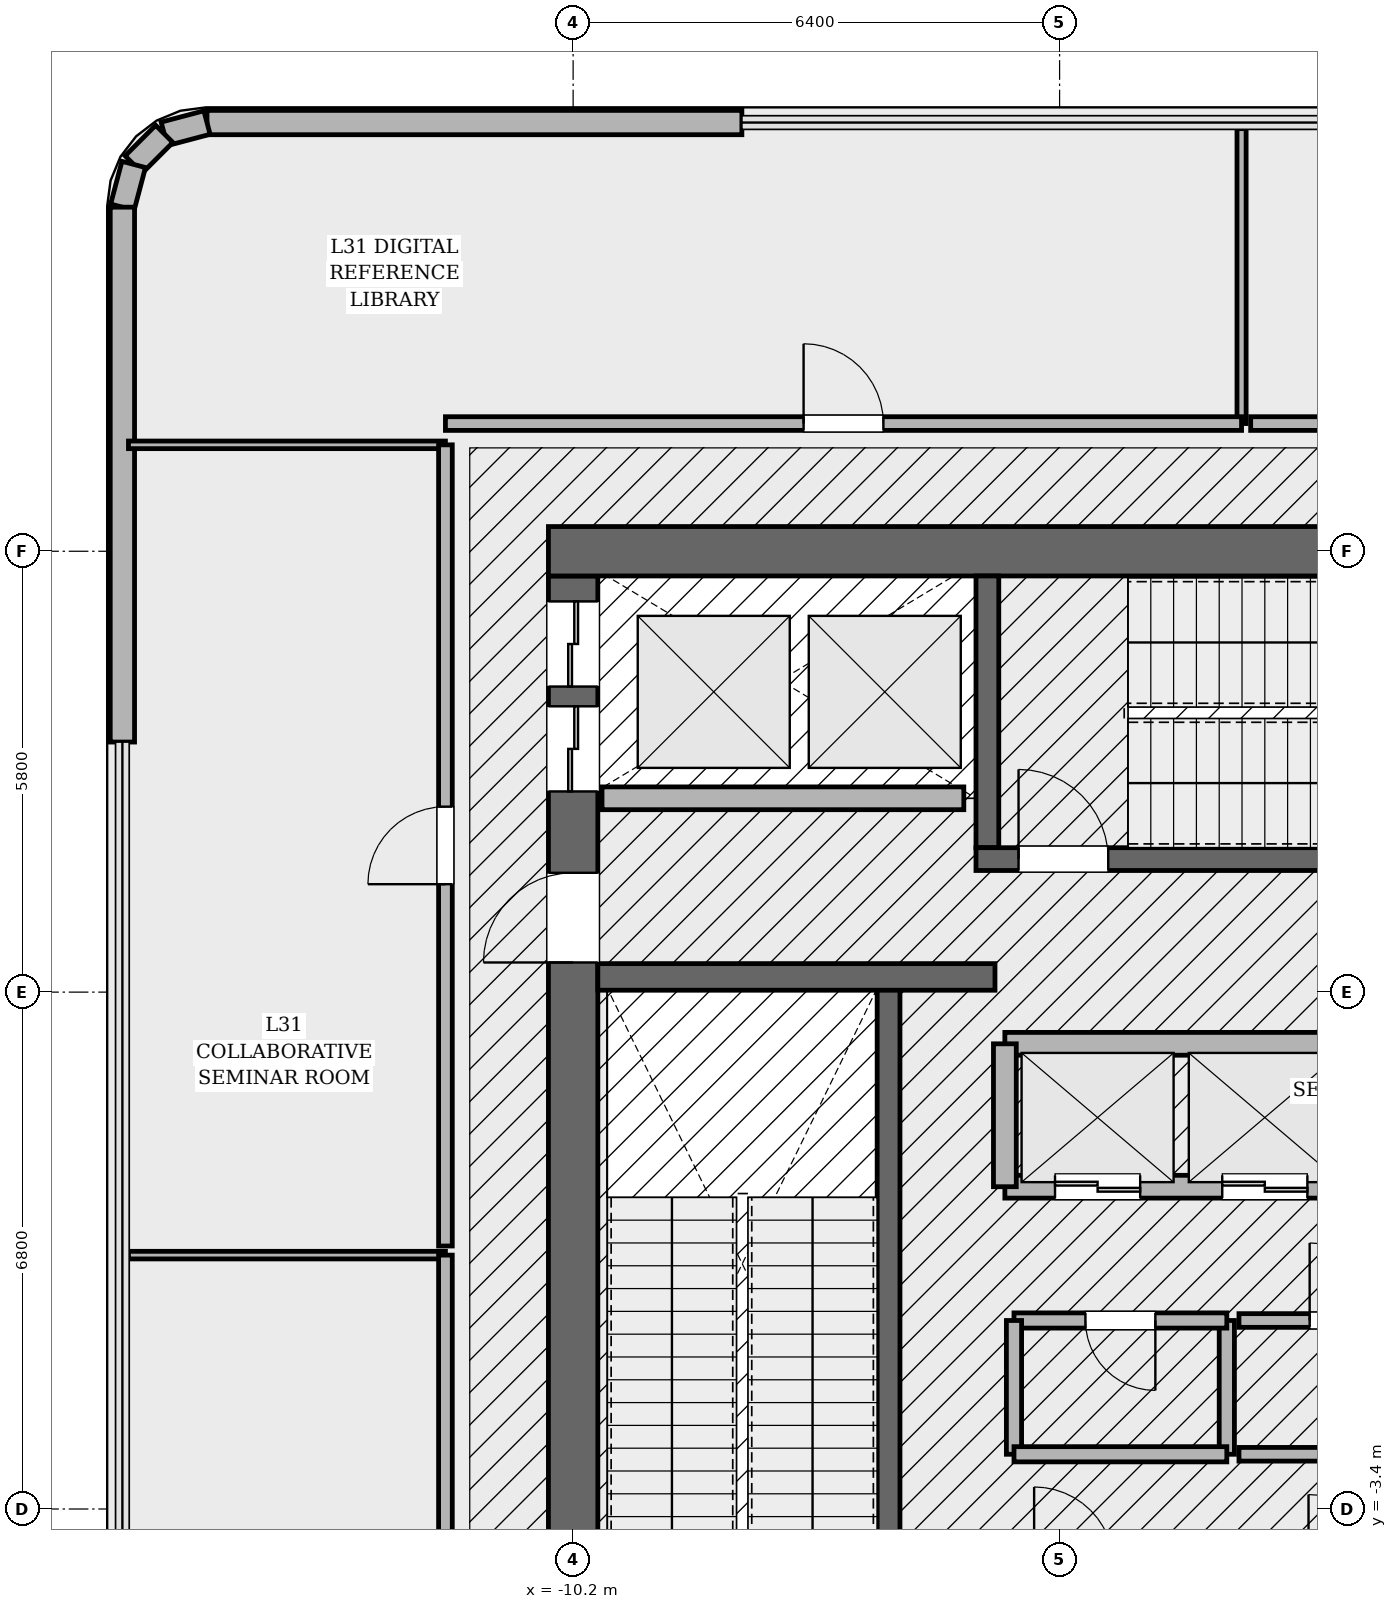
"""IFC4 building model, lengths in metres.
Left out: names, types, materials, properties, quantities, classifications, styles, units other than length and angle.
Written with IfcOpenShell. Run it as: python <this file> out.ifc"""

import sys

from ifc_helpers import new_model, si_unit, direction, frame, frame_2d, origin, place, context, subcontext, project, spatial, rectangle, extrude, element, fill, save


model = new_model("IFC4")
c1 = context("Model", 3, precision=1e-05, world=origin(), true_north=direction((0.0, 1.0)))
c2 = subcontext(c1, "Body", "Model", "MODEL_VIEW")
j1 = project(units=[si_unit("LENGTHUNIT", "METRE"), si_unit("PLANEANGLEUNIT", "RADIAN")], contexts=[c1])
p1 = place(None, origin())
s1 = spatial("IfcSite", under=j1, at=p1, CompositionType="ELEMENT")
p2 = place(p1, origin())
s2 = spatial("IfcBuilding", under=s1, at=p2, CompositionType="ELEMENT")
p3 = place(p2, frame((0.0, 0.0, 135.0)))
s3 = spatial("IfcBuildingStorey", under=s2, at=p3, CompositionType="ELEMENT", Elevation=135.0)
p4 = place(p3, frame((-10.2, -8.875, 0.0), z_axis=(0.0, 0.0, 1.0), x_axis=(0.0, 1.0, 0.0)))
e1 = element("IfcWall", 1, at=p4, inside=s3, PredefinedType="SHEAR", context=c2, shape_type="SweptSolid", body=[
    extrude(rectangle(XDim=17.75, YDim=0.65, at=frame_2d((8.875, 0.0))), origin(), (0.0, 0.0, 1.0), 4.8),
])
p5 = place(p4, frame((12.665, 0.0, 0.0)))
e2 = element("IfcOpeningElement", 2, at=p5, cuts=e1, PredefinedType="OPENING", context=c2, shape_type="SweptSolid", body=[
    extrude(rectangle(XDim=1.18, YDim=2.2, at=frame_2d((0.59, 1.1))), frame((0.0, 0.335, 0.0), z_axis=(0.0, -1.0, 0.0), x_axis=(1.0, 0.0, 0.0)), (0.0, 0.0, 1.0), 0.67),
])
p6 = place(p4, frame((14.915, 0.0, 0.0)))
e3 = element("IfcOpeningElement", 3, at=p6, cuts=e1, PredefinedType="OPENING", context=c2, shape_type="SweptSolid", body=[
    extrude(rectangle(XDim=1.12, YDim=2.25, at=frame_2d((0.56, 1.125))), frame((0.0, 0.335, 0.0), z_axis=(0.0, -1.0, 0.0), x_axis=(1.0, 0.0, 0.0)), (0.0, 0.0, 1.0), 0.67),
])
p7 = place(p4, frame((16.295, 0.0, 0.0)))
e4 = element("IfcOpeningElement", 4, at=p7, cuts=e1, PredefinedType="OPENING", context=c2, shape_type="SweptSolid", body=[
    extrude(rectangle(XDim=1.12, YDim=2.25, at=frame_2d((0.56, 1.125))), frame((0.0, 0.335, 0.0), z_axis=(0.0, -1.0, 0.0), x_axis=(1.0, 0.0, 0.0)), (0.0, 0.0, 1.0), 0.67),
])
p8 = place(p3, frame((-10.525, 9.2, 0.0), z_axis=(0.0, 0.0, 1.0), x_axis=(1.0, 0.0, 0.0)))
e5 = element("IfcWall", 5, at=p8, inside=s3, PredefinedType="SHEAR", context=c2, shape_type="SweptSolid", body=[
    extrude(rectangle(XDim=21.05, YDim=0.65, at=frame_2d((10.525, 0.0))), origin(), (0.0, 0.0, 1.0), 4.8),
])
p9 = place(p3, frame((-6.05, -5.5, 0.0), z_axis=(0.0, 0.0, 1.0), x_axis=(0.0, 1.0, 0.0)))
e6 = element("IfcWall", 6, at=p9, inside=s3, PredefinedType="SOLIDWALL", context=c2, shape_type="SweptSolid", body=[
    extrude(rectangle(XDim=8.95, YDim=0.3, at=frame_2d((4.475, 0.0))), origin(), (0.0, 0.0, 1.0), 4.8),
])
p10 = place(p3, frame((-4.75, 5.3, 0.0), z_axis=(0.0, 0.0, 1.0), x_axis=(0.0, 1.0, 0.0)))
e7 = element("IfcWall", 7, at=p10, inside=s3, PredefinedType="SOLIDWALL", context=c2, shape_type="SweptSolid", body=[
    extrude(rectangle(XDim=3.575, YDim=0.3, at=frame_2d((1.788, 0.0))), origin(), (0.0, 0.0, 1.0), 4.8),
])
p11 = place(p3, frame((-4.9, 5.15, 0.0), z_axis=(0.0, 0.0, 1.0), x_axis=(1.0, 0.0, 0.0)))
e8 = element("IfcWall", 8, at=p11, inside=s3, PredefinedType="SOLIDWALL", context=c2, shape_type="SweptSolid", body=[
    extrude(rectangle(XDim=9.8, YDim=0.3, at=frame_2d((4.9, 0.0))), origin(), (0.0, 0.0, 1.0), 4.8),
])
p12 = place(p11, frame((0.56, 0.0, 0.0)))
e9 = element("IfcOpeningElement", 9, at=p12, cuts=e8, PredefinedType="OPENING", context=c2, shape_type="SweptSolid", body=[
    extrude(rectangle(XDim=1.18, YDim=2.2, at=frame_2d((0.59, 1.1))), frame((0.0, 0.16, 0.0), z_axis=(0.0, -1.0, 0.0), x_axis=(1.0, 0.0, 0.0)), (0.0, 0.0, 1.0), 0.32),
])
p13 = place(p3, frame((-9.875, 3.6, 0.0), z_axis=(0.0, 0.0, 1.0), x_axis=(1.0, 0.0, 0.0)))
e10 = element("IfcWall", 10, at=p13, inside=s3, PredefinedType="SOLIDWALL", context=c2, shape_type="SweptSolid", body=[
    extrude(rectangle(XDim=5.225, YDim=0.35, at=frame_2d((2.613, 0.0))), origin(), (0.0, 0.0, 1.0), 4.8),
])
p14 = place(p3, frame((-7.98, 14.84, 0.0), z_axis=(0.0, 0.0, 1.0), x_axis=(-1.0, 0.0, 0.0)))
e11 = element("IfcWall", 11, at=p14, inside=s3, PredefinedType="SOLIDWALL", context=c2, shape_type="SweptSolid", body=[
    extrude(rectangle(XDim=7.037, YDim=0.32, at=frame_2d((3.519, 0.0))), origin(), (0.0, 0.0, 1.0), 3.194),
])
p15 = place(p3, frame((-15.017, 14.84, 0.0), z_axis=(0.0, 0.0, 1.0), x_axis=(-0.966665515501, -0.256042537758, 0.0)))
e12 = element("IfcWall", 12, at=p15, inside=s3, PredefinedType="SOLIDWALL", context=c2, shape_type="SweptSolid", body=[
    extrude(rectangle(XDim=0.582, YDim=0.32, at=frame_2d((0.291, 0.0))), origin(), (0.0, 0.0, 1.0), 4.52),
])
p16 = place(p3, frame((-15.579, 14.691, 0.0), z_axis=(0.0, 0.0, 1.0), x_axis=(-0.707106781187, -0.707106781187, 0.0)))
e13 = element("IfcWall", 13, at=p16, inside=s3, PredefinedType="SOLIDWALL", context=c2, shape_type="SweptSolid", body=[
    extrude(rectangle(XDim=0.569, YDim=0.32, at=frame_2d((0.284, 0.0))), origin(), (0.0, 0.0, 1.0), 4.52),
])
p17 = place(p3, frame((-15.981, 14.289, 0.0), z_axis=(0.0, 0.0, 1.0), x_axis=(-0.255650250031, -0.966769336325, 0.0)))
e14 = element("IfcWall", 14, at=p17, inside=s3, PredefinedType="SOLIDWALL", context=c2, shape_type="SweptSolid", body=[
    extrude(rectangle(XDim=0.582, YDim=0.32, at=frame_2d((0.291, 0.0))), origin(), (0.0, 0.0, 1.0), 4.52),
])
p18 = place(p3, frame((-16.13, 13.727, 0.0), z_axis=(0.0, 0.0, 1.0), x_axis=(0.0, -1.0, 0.0)))
e15 = element("IfcWall", 15, at=p18, inside=s3, PredefinedType="SOLIDWALL", context=c2, shape_type="SweptSolid", body=[
    extrude(rectangle(XDim=7.037, YDim=0.32, at=frame_2d((3.519, 0.0))), origin(), (0.0, 0.0, 1.0), 3.194),
])
p19 = place(p3, frame((-4.52, 0.84, 0.0), z_axis=(0.0, 0.0, 1.0), x_axis=(1.0, 0.0, 0.0)))
e16 = element("IfcWall", 16, at=p19, inside=s3, PredefinedType="SOLIDWALL", context=c2, shape_type="SweptSolid", body=[
    extrude(rectangle(XDim=9.04, YDim=0.3, at=frame_2d((4.52, 0.0))), origin(), (0.0, 0.0, 1.0), 4.52),
])
p20 = place(p19, frame((0.66, 0.0, 0.0)))
e17 = element("IfcOpeningElement", 17, at=p20, cuts=e16, PredefinedType="OPENING", context=c2, shape_type="SweptSolid", body=[
    extrude(rectangle(XDim=1.12, YDim=2.25, at=frame_2d((0.56, 1.125))), frame((0.0, 0.16, 0.0), z_axis=(0.0, -1.0, 0.0), x_axis=(1.0, 0.0, 0.0)), (0.0, 0.0, 1.0), 0.32),
])
p21 = place(p19, frame((2.86, 0.0, 0.0)))
e18 = element("IfcOpeningElement", 18, at=p21, cuts=e16, PredefinedType="OPENING", context=c2, shape_type="SweptSolid", body=[
    extrude(rectangle(XDim=1.12, YDim=2.25, at=frame_2d((0.56, 1.125))), frame((0.0, 0.16, 0.0), z_axis=(0.0, -1.0, 0.0), x_axis=(1.0, 0.0, 0.0)), (0.0, 0.0, 1.0), 0.32),
])
p22 = place(p19, frame((5.06, 0.0, 0.0)))
e19 = element("IfcOpeningElement", 19, at=p22, cuts=e16, PredefinedType="OPENING", context=c2, shape_type="SweptSolid", body=[
    extrude(rectangle(XDim=1.12, YDim=2.25, at=frame_2d((0.56, 1.125))), frame((0.0, 0.16, 0.0), z_axis=(0.0, -1.0, 0.0), x_axis=(1.0, 0.0, 0.0)), (0.0, 0.0, 1.0), 0.32),
])
p23 = place(p19, frame((7.26, 0.0, 0.0)))
e20 = element("IfcOpeningElement", 20, at=p23, cuts=e16, PredefinedType="OPENING", context=c2, shape_type="SweptSolid", body=[
    extrude(rectangle(XDim=1.12, YDim=2.25, at=frame_2d((0.56, 1.125))), frame((0.0, 0.16, 0.0), z_axis=(0.0, -1.0, 0.0), x_axis=(1.0, 0.0, 0.0)), (0.0, 0.0, 1.0), 0.32),
])
p24 = place(p3, frame((-4.52, 2.72, 0.0), z_axis=(0.0, 0.0, 1.0), x_axis=(1.0, 0.0, 0.0)))
e21 = element("IfcWall", 21, at=p24, inside=s3, PredefinedType="SOLIDWALL", context=c2, shape_type="SweptSolid", body=[
    extrude(rectangle(XDim=9.04, YDim=0.3, at=frame_2d((4.52, 0.0))), origin(), (0.0, 0.0, 1.0), 4.52),
])
p25 = place(p3, frame((-4.52, 0.84, 0.0), z_axis=(0.0, 0.0, 1.0), x_axis=(0.0, 1.0, 0.0)))
e22 = element("IfcWall", 22, at=p25, inside=s3, PredefinedType="SOLIDWALL", context=c2, shape_type="SweptSolid", body=[
    extrude(rectangle(XDim=1.88, YDim=0.3, at=frame_2d((0.94, 0.0))), origin(), (0.0, 0.0, 1.0), 4.52),
])
p26 = place(p3, frame((-9.82, 5.95, 0.0), z_axis=(0.0, 0.0, 1.0), x_axis=(1.0, 0.0, 0.0)))
e23 = element("IfcWall", 23, at=p26, inside=s3, PredefinedType="SOLIDWALL", context=c2, shape_type="SweptSolid", body=[
    extrude(rectangle(XDim=4.76, YDim=0.3, at=frame_2d((2.38, 0.0))), origin(), (0.0, 0.0, 1.0), 4.52),
])
p27 = place(p3, frame((-1.6, -2.68, 0.0), z_axis=(0.0, 0.0, 1.0), x_axis=(0.0, 1.0, 0.0)))
e24 = element("IfcWall", 24, at=p27, inside=s3, PredefinedType="SOLIDWALL", context=c2, shape_type="SweptSolid", body=[
    extrude(rectangle(XDim=1.76, YDim=0.2, at=frame_2d((0.88, 0.0))), origin(), (0.0, 0.0, 1.0), 4.52),
])
p28 = place(p3, frame((-1.6, -0.92, 0.0), z_axis=(0.0, 0.0, 1.0), x_axis=(-1.0, 0.0, 0.0)))
e25 = element("IfcWall", 25, at=p28, inside=s3, PredefinedType="SOLIDWALL", context=c2, shape_type="SweptSolid", body=[
    extrude(rectangle(XDim=2.8, YDim=0.2, at=frame_2d((1.4, 0.0))), origin(), (0.0, 0.0, 1.0), 4.52),
])
p29 = place(p28, frame((0.94, 0.0, 0.0)))
e26 = element("IfcOpeningElement", 26, at=p29, cuts=e25, PredefinedType="OPENING", context=c2, shape_type="SweptSolid", body=[
    extrude(rectangle(XDim=0.92, YDim=2.1, at=frame_2d((0.46, 1.05))), frame((0.0, 0.11, 0.0), z_axis=(0.0, -1.0, 0.0), x_axis=(1.0, 0.0, 0.0)), (0.0, 0.0, 1.0), 0.22),
])
p30 = place(p3, frame((-4.4, -0.92, 0.0), z_axis=(0.0, 0.0, 1.0), x_axis=(0.0, -1.0, 0.0)))
e27 = element("IfcWall", 27, at=p30, inside=s3, PredefinedType="SOLIDWALL", context=c2, shape_type="SweptSolid", body=[
    extrude(rectangle(XDim=1.76, YDim=0.2, at=frame_2d((0.88, 0.0))), origin(), (0.0, 0.0, 1.0), 4.52),
])
p31 = place(p3, frame((-4.4, -2.68, 0.0), z_axis=(0.0, 0.0, 1.0), x_axis=(1.0, 0.0, 0.0)))
e28 = element("IfcWall", 28, at=p31, inside=s3, PredefinedType="SOLIDWALL", context=c2, shape_type="SweptSolid", body=[
    extrude(rectangle(XDim=2.8, YDim=0.2, at=frame_2d((1.4, 0.0))), origin(), (0.0, 0.0, 1.0), 4.52),
])
p32 = place(p3, frame((1.44, -0.92, 0.0), z_axis=(0.0, 0.0, 1.0), x_axis=(-1.0, 0.0, 0.0)))
e29 = element("IfcWall", 29, at=p32, inside=s3, PredefinedType="PARTITIONING", context=c2, shape_type="SweptSolid", body=[
    extrude(rectangle(XDim=2.88, YDim=0.18, at=frame_2d((1.44, 0.0))), origin(), (0.0, 0.0, 1.0), 4.52),
])
p33 = place(p32, frame((0.93, 0.0, 0.0)))
e30 = element("IfcOpeningElement", 30, at=p33, cuts=e29, PredefinedType="OPENING", context=c2, shape_type="SweptSolid", body=[
    extrude(rectangle(XDim=1.02, YDim=2.2, at=frame_2d((0.51, 1.1))), frame((0.0, 0.1, 0.0), z_axis=(0.0, -1.0, 0.0), x_axis=(1.0, 0.0, 0.0)), (0.0, 0.0, 1.0), 0.2),
])
p34 = place(p3, frame((-1.44, -2.68, 0.0), z_axis=(0.0, 0.0, 1.0), x_axis=(1.0, 0.0, 0.0)))
e31 = element("IfcWall", 31, at=p34, inside=s3, PredefinedType="PARTITIONING", context=c2, shape_type="SweptSolid", body=[
    extrude(rectangle(XDim=2.88, YDim=0.18, at=frame_2d((1.44, 0.0))), origin(), (0.0, 0.0, 1.0), 4.52),
])
p35 = place(p3, frame((-16.05, -0.06, 0.0), z_axis=(0.0, 0.0, 1.0), x_axis=(1.0, 0.0, 0.0)))
e32 = element("IfcWall", 32, at=p35, inside=s3, PredefinedType="PARTITIONING", context=c2, shape_type="SweptSolid", body=[
    extrude(rectangle(XDim=4.17, YDim=0.1, at=frame_2d((2.085, 0.0))), origin(), (0.0, 0.0, 1.0), 4.52),
])
p36 = place(p3, frame((-11.88, -0.06, 0.0), z_axis=(0.0, 0.0, 1.0), x_axis=(0.0, -1.0, 0.0)))
e33 = element("IfcWall", 33, at=p36, inside=s3, PredefinedType="PARTITIONING", context=c2, shape_type="SweptSolid", body=[
    extrude(rectangle(XDim=10.54, YDim=0.18, at=frame_2d((5.27, 0.0))), origin(), (0.0, 0.0, 1.0), 3.194),
])
p37 = place(p36, frame((4.76, 0.0, 0.0)))
e34 = element("IfcOpeningElement", 34, at=p37, cuts=e33, PredefinedType="OPENING", context=c2, shape_type="SweptSolid", body=[
    extrude(rectangle(XDim=1.02, YDim=2.2, at=frame_2d((0.51, 1.1))), frame((0.0, 0.1, 0.0), z_axis=(0.0, -1.0, 0.0), x_axis=(1.0, 0.0, 0.0)), (0.0, 0.0, 1.0), 0.2),
])
p38 = place(p3, frame((-16.05, 10.6, 0.0), z_axis=(0.0, 0.0, 1.0), x_axis=(1.0, 0.0, 0.0)))
e35 = element("IfcWall", 35, at=p38, inside=s3, PredefinedType="PARTITIONING", context=c2, shape_type="SweptSolid", body=[
    extrude(rectangle(XDim=4.17, YDim=0.1, at=frame_2d((2.085, 0.0))), origin(), (0.0, 0.0, 1.0), 4.114),
])
p39 = place(p3, frame((-11.88, 10.6, 0.0), z_axis=(0.0, 0.0, 1.0), x_axis=(0.0, -1.0, 0.0)))
e36 = element("IfcWall", 36, at=p39, inside=s3, PredefinedType="PARTITIONING", context=c2, shape_type="SweptSolid", body=[
    extrude(rectangle(XDim=10.54, YDim=0.18, at=frame_2d((5.27, 0.0))), origin(), (0.0, 0.0, 1.0), 3.194),
])
p40 = place(p39, frame((4.76, 0.0, 0.0)))
e37 = element("IfcOpeningElement", 37, at=p40, cuts=e36, PredefinedType="OPENING", context=c2, shape_type="SweptSolid", body=[
    extrude(rectangle(XDim=1.02, YDim=2.2, at=frame_2d((0.51, 1.1))), frame((0.0, 0.1, 0.0), z_axis=(0.0, -1.0, 0.0), x_axis=(1.0, 0.0, 0.0)), (0.0, 0.0, 1.0), 0.2),
])
p41 = place(p3, frame((-1.406, 14.76, 0.0), z_axis=(0.0, 0.0, 1.0), x_axis=(0.0, -1.0, 0.0)))
e38 = element("IfcWall", 38, at=p41, inside=s3, PredefinedType="PARTITIONING", context=c2, shape_type="SweptSolid", body=[
    extrude(rectangle(XDim=3.88, YDim=0.12, at=frame_2d((1.94, 0.0))), origin(), (0.0, 0.0, 1.0), 4.52),
])
p42 = place(p3, frame((-1.406, 10.88, 0.0), z_axis=(0.0, 0.0, 1.0), x_axis=(-1.0, 0.0, 0.0)))
e39 = element("IfcWall", 39, at=p42, inside=s3, PredefinedType="PARTITIONING", context=c2, shape_type="SweptSolid", body=[
    extrude(rectangle(XDim=10.474, YDim=0.18, at=frame_2d((5.237, 0.0))), origin(), (0.0, 0.0, 1.0), 3.194),
])
p43 = place(p42, frame((4.712, 0.0, 0.0)))
e40 = element("IfcOpeningElement", 40, at=p43, cuts=e39, PredefinedType="OPENING", context=c2, shape_type="SweptSolid", body=[
    extrude(rectangle(XDim=1.05, YDim=2.2, at=frame_2d((0.525, 1.1))), frame((0.0, 0.1, 0.0), z_axis=(0.0, -1.0, 0.0), x_axis=(1.0, 0.0, 0.0)), (0.0, 0.0, 1.0), 0.2),
])
p44 = place(p3, frame((11.88, 10.88, 0.0), z_axis=(0.0, 0.0, 1.0), x_axis=(-1.0, 0.0, 0.0)))
e41 = element("IfcWall", 41, at=p44, inside=s3, PredefinedType="PARTITIONING", context=c2, shape_type="SweptSolid", body=[
    extrude(rectangle(XDim=13.166, YDim=0.18, at=frame_2d((6.583, 0.0))), origin(), (0.0, 0.0, 1.0), 3.194),
])
p45 = place(p44, frame((6.058, 0.0, 0.0)))
e42 = element("IfcOpeningElement", 42, at=p45, cuts=e41, PredefinedType="OPENING", context=c2, shape_type="SweptSolid", body=[
    extrude(rectangle(XDim=1.05, YDim=2.2, at=frame_2d((0.525, 1.1))), frame((0.0, 0.1, 0.0), z_axis=(0.0, -1.0, 0.0), x_axis=(1.0, 0.0, 0.0)), (0.0, 0.0, 1.0), 0.2),
])
p46 = place(p12, origin())
e43 = element("IfcDoor", 43, at=p46, inside=s3, OperationType="SINGLE_SWING_LEFT", PredefinedType="DOOR", context=c2, shape_type="SweptSolid", body=[
    extrude(rectangle(XDim=1.18, YDim=2.2, at=frame_2d((0.59, 1.1))), frame((0.0, 0.025, 0.0), z_axis=(0.0, -1.0, 0.0), x_axis=(1.0, 0.0, 0.0)), (0.0, 0.0, 1.0), 0.05),
])
fill(e9, e43)
p47 = place(p5, origin())
e44 = element("IfcDoor", 44, at=p47, inside=s3, OperationType="SINGLE_SWING_LEFT", PredefinedType="DOOR", context=c2, shape_type="SweptSolid", body=[
    extrude(rectangle(XDim=1.18, YDim=2.2, at=frame_2d((0.59, 1.1))), frame((0.0, 0.025, 0.0), z_axis=(0.0, -1.0, 0.0), x_axis=(1.0, 0.0, 0.0)), (0.0, 0.0, 1.0), 0.05),
])
fill(e2, e44)
p48 = place(p20, origin())
e45 = element("IfcDoor", 45, at=p48, inside=s3, OperationType="DOUBLE_DOOR_SLIDING", PredefinedType="DOOR", context=c2, shape_type="SweptSolid", body=[
    extrude(rectangle(XDim=1.12, YDim=2.25, at=frame_2d((0.56, 1.125))), frame((0.0, 0.025, 0.0), z_axis=(0.0, -1.0, 0.0), x_axis=(1.0, 0.0, 0.0)), (0.0, 0.0, 1.0), 0.05),
])
fill(e17, e45)
p49 = place(p21, origin())
e46 = element("IfcDoor", 46, at=p49, inside=s3, OperationType="DOUBLE_DOOR_SLIDING", PredefinedType="DOOR", context=c2, shape_type="SweptSolid", body=[
    extrude(rectangle(XDim=1.12, YDim=2.25, at=frame_2d((0.56, 1.125))), frame((0.0, 0.025, 0.0), z_axis=(0.0, -1.0, 0.0), x_axis=(1.0, 0.0, 0.0)), (0.0, 0.0, 1.0), 0.05),
])
fill(e18, e46)
p50 = place(p6, origin())
e47 = element("IfcDoor", 47, at=p50, inside=s3, OperationType="DOUBLE_DOOR_SLIDING", PredefinedType="DOOR", context=c2, shape_type="SweptSolid", body=[
    extrude(rectangle(XDim=1.12, YDim=2.25, at=frame_2d((0.56, 1.125))), frame((0.0, 0.025, 0.0), z_axis=(0.0, -1.0, 0.0), x_axis=(1.0, 0.0, 0.0)), (0.0, 0.0, 1.0), 0.05),
])
fill(e3, e47)
p51 = place(p7, origin())
e48 = element("IfcDoor", 48, at=p51, inside=s3, OperationType="DOUBLE_DOOR_SLIDING", PredefinedType="DOOR", context=c2, shape_type="SweptSolid", body=[
    extrude(rectangle(XDim=1.12, YDim=2.25, at=frame_2d((0.56, 1.125))), frame((0.0, 0.025, 0.0), z_axis=(0.0, -1.0, 0.0), x_axis=(1.0, 0.0, 0.0)), (0.0, 0.0, 1.0), 0.05),
])
fill(e4, e48)
p52 = place(p29, origin())
e49 = element("IfcDoor", 49, at=p52, inside=s3, OperationType="SINGLE_SWING_LEFT", PredefinedType="DOOR", context=c2, shape_type="SweptSolid", body=[
    extrude(rectangle(XDim=0.92, YDim=2.1, at=frame_2d((0.46, 1.05))), frame((0.0, 0.025, 0.0), z_axis=(0.0, -1.0, 0.0), x_axis=(1.0, 0.0, 0.0)), (0.0, 0.0, 1.0), 0.05),
])
fill(e26, e49)
p53 = place(p33, origin())
e50 = element("IfcDoor", 50, at=p53, inside=s3, OperationType="SINGLE_SWING_RIGHT", PredefinedType="DOOR", context=c2, shape_type="SweptSolid", body=[
    extrude(rectangle(XDim=1.02, YDim=2.2, at=frame_2d((0.51, 1.1))), frame((0.0, 0.025, 0.0), z_axis=(0.0, -1.0, 0.0), x_axis=(1.0, 0.0, 0.0)), (0.0, 0.0, 1.0), 0.05),
])
fill(e30, e50)
p54 = place(p40, origin())
e51 = element("IfcDoor", 51, at=p54, inside=s3, OperationType="SINGLE_SWING_RIGHT", PredefinedType="DOOR", context=c2, shape_type="SweptSolid", body=[
    extrude(rectangle(XDim=1.02, YDim=2.2, at=frame_2d((0.51, 1.1))), frame((0.0, 0.025, 0.0), z_axis=(0.0, -1.0, 0.0), x_axis=(1.0, 0.0, 0.0)), (0.0, 0.0, 1.0), 0.05),
])
fill(e37, e51)
p55 = place(p43, origin())
e52 = element("IfcDoor", 52, at=p55, inside=s3, OperationType="SINGLE_SWING_RIGHT", PredefinedType="DOOR", context=c2, shape_type="SweptSolid", body=[
    extrude(rectangle(XDim=1.05, YDim=2.2, at=frame_2d((0.525, 1.1))), frame((0.0, 0.025, 0.0), z_axis=(0.0, -1.0, 0.0), x_axis=(1.0, 0.0, 0.0)), (0.0, 0.0, 1.0), 0.05),
])
fill(e40, e52)
save(model, sys.argv[1])
